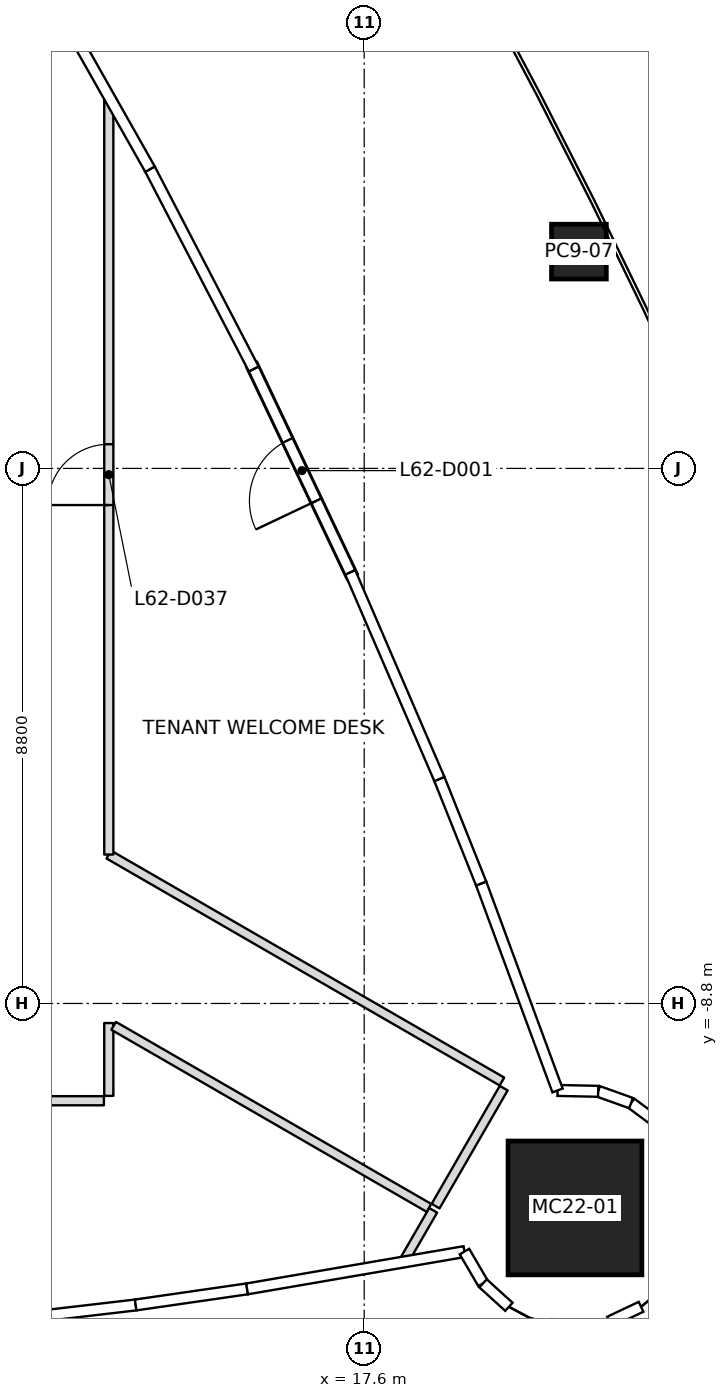
"""IFC4 building model, lengths in metres.
Left out: names, types, materials, properties, quantities, classifications, styles, units other than length and angle.
Written with IfcOpenShell. Run it as: python <this file> out.ifc"""

import sys

from ifc_helpers import new_model, si_unit, direction, frame, frame_2d, origin, origin_2d, place, context, subcontext, project, spatial, rectangle, extrude, element, fill, save


model = new_model("IFC4")
c1 = context("Model", 3, precision=1e-05, world=origin(), true_north=direction((0.0, 1.0)))
c2 = subcontext(c1, "Body", "Model", "MODEL_VIEW")
j1 = project(units=[si_unit("LENGTHUNIT", "METRE"), si_unit("PLANEANGLEUNIT", "RADIAN")], contexts=[c1])
p1 = place(None, origin())
s1 = spatial("IfcSite", under=j1, at=p1, CompositionType="ELEMENT")
p2 = place(p1, origin())
s2 = spatial("IfcBuilding", under=s1, at=p2, CompositionType="ELEMENT")
p3 = place(p2, frame((0.0, 0.0, 275.0)))
s3 = spatial("IfcBuildingStorey", under=s2, at=p3, CompositionType="ELEMENT", Elevation=275.0)
p4 = place(p3, frame((21.067, -12.163, 0.0), z_axis=(-0.027756720281, 0.01604399436, 0.999485945236), x_axis=(0.999614708015, 0.000445500311, 0.027753144871)))
e1 = element("IfcColumn", 1, at=p4, inside=s3, PredefinedType="COLUMN", context=c2, shape_type="SweptSolid", body=[
    extrude(rectangle(XDim=2.2, YDim=2.2, at=origin_2d()), origin(), (0.0, 0.0, 1.0), 4.002),
])
p5 = place(p3, frame((21.132, 3.565, 0.0), z_axis=(-0.014036674448, 0.002013957638, 0.999899452818), x_axis=(-0.4393691729, 0.898271169946, -0.007977164207)))
e2 = element("IfcColumn", 2, at=p5, inside=s3, PredefinedType="COLUMN", context=c2, shape_type="SweptSolid", body=[
    extrude(rectangle(XDim=0.9, YDim=0.9, at=origin_2d()), origin(), (0.0, 0.0, 1.0), 4.0),
])
p6 = place(p3, frame((17.409, -1.79, 0.0), z_axis=(0.0, 0.0, 1.0), x_axis=(-0.428705303782, 0.903444388166, 0.0)))
e3 = element("IfcWall", 3, at=p6, inside=s3, PredefinedType="SOLIDWALL", context=c2, shape_type="SweptSolid", body=[
    extrude(rectangle(XDim=3.882, YDim=0.2, at=frame_2d((1.941, 0.0))), origin(), (0.0, 0.0, 1.0), 3.317),
])
p7 = place(p6, frame((1.391, 0.0, 0.0)))
e4 = element("IfcOpeningElement", 4, at=p7, cuts=e3, PredefinedType="OPENING", context=c2, shape_type="SweptSolid", body=[
    extrude(rectangle(XDim=1.1, YDim=2.1, at=frame_2d((0.55, 1.05))), frame((0.0, 0.1, 0.0), z_axis=(0.0, -1.0, 0.0), x_axis=(1.0, 0.0, 0.0)), (0.0, 0.0, 1.0), 0.2),
])
p8 = place(p3, frame((18.735, -12.202, 0.0), z_axis=(0.0, 0.0, 1.0), x_axis=(-0.500069196213, -0.865985449646, 0.0)))
e5 = element("IfcWall", 5, at=p8, inside=s3, PredefinedType="PARTITIONING", context=c2, shape_type="SweptSolid", body=[
    extrude(rectangle(XDim=0.995, YDim=0.15, at=frame_2d((0.498, 0.0))), origin(), (0.0, 0.0, 1.0), 3.45),
])
p9 = place(p3, frame((1.2, -10.4, 0.0), z_axis=(0.0, 0.0, 1.0), x_axis=(1.0, 0.0, 0.0)))
e6 = element("IfcWall", 6, at=p9, inside=s3, PredefinedType="PARTITIONING", context=c2, shape_type="SweptSolid", body=[
    extrude(rectangle(XDim=12.12, YDim=0.15, at=frame_2d((6.06, 0.0))), origin(), (0.0, 0.0, 1.0), 3.317),
])
p10 = place(p9, frame((2.05, 0.0, 0.0)))
e7 = element("IfcOpeningElement", 7, at=p10, cuts=e6, PredefinedType="OPENING", context=c2, shape_type="SweptSolid", body=[
    extrude(rectangle(XDim=0.9, YDim=2.1, at=frame_2d((0.45, 1.05))), frame((0.0, 0.075, 0.0), z_axis=(0.0, -1.0, 0.0), x_axis=(1.0, 0.0, 0.0)), (0.0, 0.0, 1.0), 0.15),
])
p11 = place(p9, frame((8.15, 0.0, 0.0)))
e8 = element("IfcOpeningElement", 8, at=p11, cuts=e6, PredefinedType="OPENING", context=c2, shape_type="SweptSolid", body=[
    extrude(rectangle(XDim=1.0, YDim=2.1, at=frame_2d((0.5, 1.05))), frame((0.0, 0.075, 0.0), z_axis=(0.0, -1.0, 0.0), x_axis=(1.0, 0.0, 0.0)), (0.0, 0.0, 1.0), 0.15),
])
p12 = place(p3, frame((13.4, -10.32, 0.0), z_axis=(0.0, 0.0, 1.0), x_axis=(0.0, 1.0, 0.0)))
e9 = element("IfcWall", 9, at=p12, inside=s3, PredefinedType="PARTITIONING", context=c2, shape_type="SweptSolid", body=[
    extrude(rectangle(XDim=1.198, YDim=0.15, at=frame_2d((0.599, 0.0))), origin(), (0.0, 0.0, 1.0), 3.233),
])
p13 = place(p3, frame((13.479, -9.168, 0.0), z_axis=(0.0, 0.0, 1.0), x_axis=(0.866026717539, -0.499997724503, 0.0)))
e10 = element("IfcWall", 10, at=p13, inside=s3, PredefinedType="PARTITIONING", context=c2, shape_type="SweptSolid", body=[
    extrude(rectangle(XDim=5.988, YDim=0.15, at=frame_2d((2.994, 0.0))), origin(), (0.0, 0.0, 1.0), 3.233),
])
p14 = place(p3, frame((19.865, -10.083, 0.0), z_axis=(0.0, 0.0, 1.0), x_axis=(-0.86603092396, 0.499990438654, 0.0)))
e11 = element("IfcWall", 11, at=p14, inside=s3, PredefinedType="PARTITIONING", context=c2, shape_type="SweptSolid", body=[
    extrude(rectangle(XDim=7.466, YDim=0.15, at=frame_2d((3.733, 0.0))), origin(), (0.0, 0.0, 1.0), 3.317),
])
p15 = place(p3, frame((13.4, -6.351, 0.0), z_axis=(0.0, 0.0, 1.0), x_axis=(0.0, 1.0, 0.0)))
e12 = element("IfcWall", 12, at=p15, inside=s3, PredefinedType="PARTITIONING", context=c2, shape_type="SweptSolid", body=[
    extrude(rectangle(XDim=12.496, YDim=0.15, at=frame_2d((6.248, 0.0))), origin(), (0.0, 0.0, 1.0), 3.317),
])
p16 = place(p15, frame((5.748, 0.0, 0.0)))
e13 = element("IfcOpeningElement", 13, at=p16, cuts=e12, PredefinedType="OPENING", context=c2, shape_type="SweptSolid", body=[
    extrude(rectangle(XDim=1.0, YDim=2.1, at=frame_2d((0.5, 1.05))), frame((0.0, 0.075, 0.0), z_axis=(0.0, -1.0, 0.0), x_axis=(1.0, 0.0, 0.0)), (0.0, 0.0, 1.0), 0.15),
])
p17 = place(p3, frame((18.775, -12.133, 0.0), z_axis=(0.0, 0.0, 1.0), x_axis=(0.49994888933, 0.866054910533, 0.0)))
e14 = element("IfcWall", 14, at=p17, inside=s3, PredefinedType="PARTITIONING", context=c2, shape_type="SweptSolid", body=[
    extrude(rectangle(XDim=2.24, YDim=0.15, at=frame_2d((1.12, 0.0))), origin(), (0.0, 0.0, 1.0), 3.233),
])
p18 = place(p7, origin())
e15 = element("IfcDoor", 15, at=p18, inside=s3, OperationType="SINGLE_SWING_LEFT", PredefinedType="DOOR", context=c2, shape_type="SweptSolid", body=[
    extrude(rectangle(XDim=1.1, YDim=2.1, at=frame_2d((0.55, 1.05))), frame((0.0, 0.025, 0.0), z_axis=(0.0, -1.0, 0.0), x_axis=(1.0, 0.0, 0.0)), (0.0, 0.0, 1.0), 0.05),
])
fill(e4, e15)
p19 = place(p16, origin())
e16 = element("IfcDoor", 16, at=p19, inside=s3, OperationType="SINGLE_SWING_LEFT", PredefinedType="DOOR", context=c2, shape_type="SweptSolid", body=[
    extrude(rectangle(XDim=1.0, YDim=2.1, at=frame_2d((0.5, 1.05))), frame((0.0, 0.025, 0.0), z_axis=(0.0, -1.0, 0.0), x_axis=(1.0, 0.0, 0.0)), (0.0, 0.0, 1.0), 0.05),
])
fill(e13, e16)
save(model, sys.argv[1])
